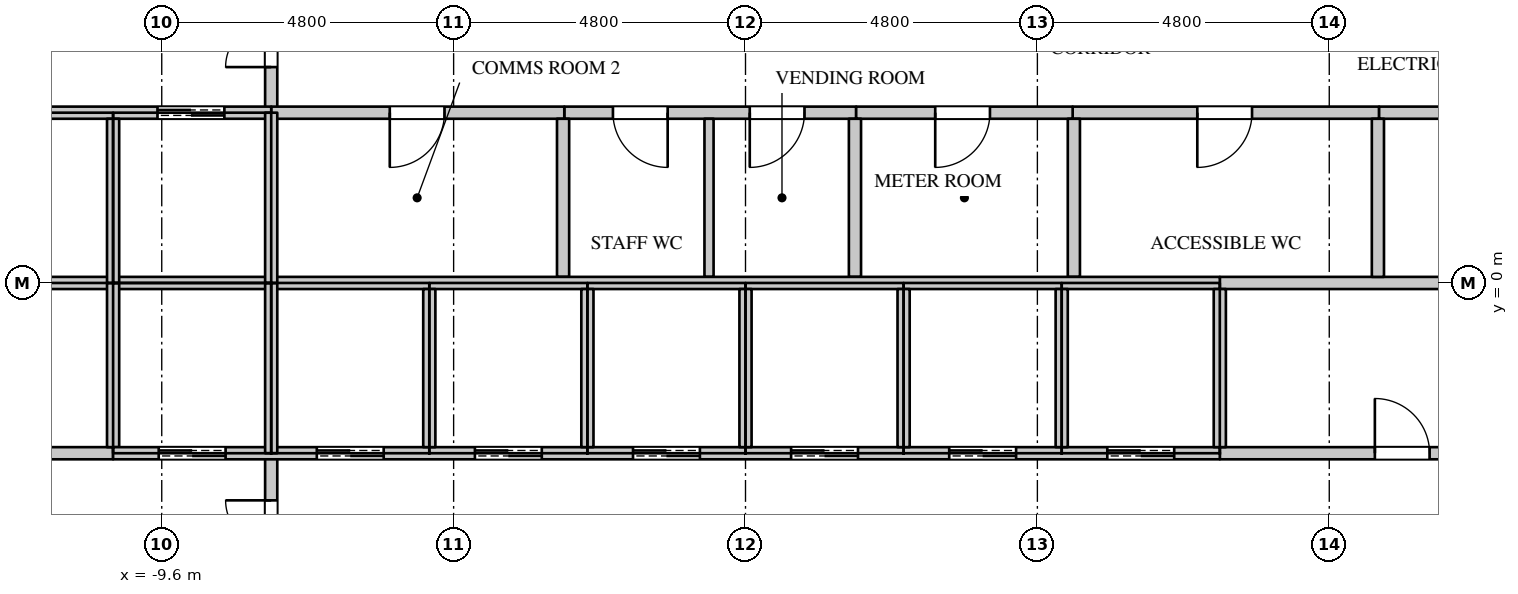
"""IFC4 building model, lengths in metres.
Left out: names, types, materials, properties, quantities, classifications, styles, units other than length and angle.
Written with IfcOpenShell. Run it as: python <this file> out.ifc"""

import sys

from ifc_helpers import new_model, si_unit, direction, frame, frame_2d, origin, place, context, subcontext, project, spatial, rectangle, extrude, element, fill, save


model = new_model("IFC4")
c1 = context("Model", 3, precision=1e-05, world=origin(), true_north=direction((0.0, 1.0)))
c2 = subcontext(c1, "Body", "Model", "MODEL_VIEW")
j1 = project(units=[si_unit("LENGTHUNIT", "METRE"), si_unit("PLANEANGLEUNIT", "RADIAN")], contexts=[c1])
p1 = place(None, origin())
s1 = spatial("IfcSite", under=j1, at=p1, CompositionType="ELEMENT")
p2 = place(p1, origin())
s2 = spatial("IfcBuilding", under=s1, at=p2, CompositionType="ELEMENT")
p3 = place(p2, frame((0.0, 0.0, 314.7)))
s3 = spatial("IfcBuildingStorey", under=s2, at=p3, CompositionType="ELEMENT", Elevation=314.7)
p4 = place(p3, frame((-7.8, -8.075, 0.0), z_axis=(0.0, 0.0, 1.0), x_axis=(0.0, 1.0, 0.0)))
e1 = element("IfcWall", 1, at=p4, inside=s3, PredefinedType="PARTITIONING", context=c2, shape_type="SweptSolid", body=[
    extrude(rectangle(XDim=5.275, YDim=0.2, at=frame_2d((2.637, 0.0))), origin(), (0.0, 0.0, 1.0), 5.1),
])
p5 = place(p4, frame((3.0, 0.0, 0.0)))
e2 = element("IfcOpeningElement", 2, at=p5, cuts=e1, PredefinedType="OPENING", context=c2, shape_type="SweptSolid", body=[
    extrude(rectangle(XDim=1.5, YDim=2.4, at=frame_2d((0.75, 1.2))), frame((0.0, 0.11, 0.0), z_axis=(0.0, -1.0, 0.0), x_axis=(1.0, 0.0, 0.0)), (0.0, 0.0, 1.0), 0.22),
])
p6 = place(p3, frame((-7.8, 2.8, 0.0), z_axis=(0.0, 0.0, 1.0), x_axis=(0.0, 1.0, 0.0)))
e3 = element("IfcWall", 3, at=p6, inside=s3, PredefinedType="PARTITIONING", context=c2, shape_type="SweptSolid", body=[
    extrude(rectangle(XDim=5.275, YDim=0.2, at=frame_2d((2.637, 0.0))), origin(), (0.0, 0.0, 1.0), 5.1),
])
p7 = place(p6, frame((0.75, 0.0, 0.0)))
e4 = element("IfcOpeningElement", 4, at=p7, cuts=e3, PredefinedType="OPENING", context=c2, shape_type="SweptSolid", body=[
    extrude(rectangle(XDim=1.5, YDim=2.4, at=frame_2d((0.75, 1.2))), frame((0.0, 0.11, 0.0), z_axis=(0.0, -1.0, 0.0), x_axis=(1.0, 0.0, 0.0)), (0.0, 0.0, 1.0), 0.22),
])
p8 = place(p3, frame((-2.98, 2.8, 0.0), z_axis=(0.0, 0.0, 1.0), x_axis=(1.0, 0.0, 0.0)))
e5 = element("IfcWall", 5, at=p8, inside=s3, PredefinedType="PARTITIONING", context=c2, shape_type="SweptSolid", body=[
    extrude(rectangle(XDim=4.8, YDim=0.2, at=frame_2d((2.4, 0.0))), origin(), (0.0, 0.0, 1.0), 5.1),
])
p9 = place(p8, frame((0.8, 0.0, 0.0)))
e6 = element("IfcOpeningElement", 6, at=p9, cuts=e5, PredefinedType="OPENING", context=c2, shape_type="SweptSolid", body=[
    extrude(rectangle(XDim=0.9, YDim=2.2, at=frame_2d((0.45, 1.1))), frame((0.0, 0.11, 0.0), z_axis=(0.0, -1.0, 0.0), x_axis=(1.0, 0.0, 0.0)), (0.0, 0.0, 1.0), 0.22),
])
p10 = place(p8, frame((3.05, 0.0, 0.0)))
e7 = element("IfcOpeningElement", 7, at=p10, cuts=e5, PredefinedType="OPENING", context=c2, shape_type="SweptSolid", body=[
    extrude(rectangle(XDim=0.9, YDim=2.2, at=frame_2d((0.45, 1.1))), frame((0.0, 0.11, 0.0), z_axis=(0.0, -1.0, 0.0), x_axis=(1.0, 0.0, 0.0)), (0.0, 0.0, 1.0), 0.22),
])
p11 = place(p3, frame((5.38, 2.8, 0.0), z_axis=(0.0, 0.0, 1.0), x_axis=(1.0, 0.0, 0.0)))
e8 = element("IfcWall", 8, at=p11, inside=s3, PredefinedType="PARTITIONING", context=c2, shape_type="SweptSolid", body=[
    extrude(rectangle(XDim=5.04, YDim=0.2, at=frame_2d((2.52, 0.0))), origin(), (0.0, 0.0, 1.0), 5.1),
])
p12 = place(p11, frame((2.05, 0.0, 0.0)))
e9 = element("IfcOpeningElement", 9, at=p12, cuts=e8, PredefinedType="OPENING", context=c2, shape_type="SweptSolid", body=[
    extrude(rectangle(XDim=0.9, YDim=2.2, at=frame_2d((0.45, 1.1))), frame((0.0, 0.11, 0.0), z_axis=(0.0, -1.0, 0.0), x_axis=(1.0, 0.0, 0.0)), (0.0, 0.0, 1.0), 0.22),
])
p13 = place(p3, frame((-0.6, 0.1, 0.0), z_axis=(0.0, 0.0, 1.0), x_axis=(0.0, 1.0, 0.0)))
e10 = element("IfcWall", 10, at=p13, inside=s3, PredefinedType="PARTITIONING", context=c2, shape_type="SweptSolid", body=[
    extrude(rectangle(XDim=2.6, YDim=0.15, at=frame_2d((1.3, 0.0))), origin(), (0.0, 0.0, 1.0), 5.1),
])
p14 = place(p3, frame((-13.77, -2.8, 0.0), z_axis=(0.0, 0.0, 1.0), x_axis=(1.0, 0.0, 0.0)))
e11 = element("IfcWall", 11, at=p14, inside=s3, PredefinedType="PARTITIONING", context=c2, shape_type="SweptSolid", body=[
    extrude(rectangle(XDim=3.37, YDim=0.2, at=frame_2d((1.685, 0.0))), origin(), (0.0, 0.0, 1.0), 5.1),
])
p15 = place(p14, frame((1.35, 0.0, 0.0)))
e12 = element("IfcOpeningElement", 12, at=p15, cuts=e11, PredefinedType="OPENING", context=c2, shape_type="SweptSolid", body=[
    extrude(rectangle(XDim=0.6, YDim=2.0, at=frame_2d((0.3, 1.0))), frame((0.0, 0.11, 0.0), z_axis=(0.0, -1.0, 0.0), x_axis=(1.0, 0.0, 0.0)), (0.0, 0.0, 1.0), 0.22),
])
p16 = place(p3, frame((-7.8, 2.8, 0.0), z_axis=(0.0, 0.0, 1.0), x_axis=(1.0, 0.0, 0.0)))
e13 = element("IfcWall", 13, at=p16, inside=s3, PredefinedType="PARTITIONING", context=c2, shape_type="SweptSolid", body=[
    extrude(rectangle(XDim=4.82, YDim=0.2, at=frame_2d((2.41, 0.0))), origin(), (0.0, 0.0, 1.0), 5.1),
])
p17 = place(p16, frame((1.95, 0.0, 0.0)))
e14 = element("IfcOpeningElement", 14, at=p17, cuts=e13, PredefinedType="OPENING", context=c2, shape_type="SweptSolid", body=[
    extrude(rectangle(XDim=0.9, YDim=2.2, at=frame_2d((0.45, 1.1))), frame((0.0, 0.11, 0.0), z_axis=(0.0, -1.0, 0.0), x_axis=(1.0, 0.0, 0.0)), (0.0, 0.0, 1.0), 0.22),
])
p18 = place(p3, frame((-3.0, 0.1, 0.0), z_axis=(0.0, 0.0, 1.0), x_axis=(0.0, 1.0, 0.0)))
e15 = element("IfcWall", 15, at=p18, inside=s3, PredefinedType="PARTITIONING", context=c2, shape_type="SweptSolid", body=[
    extrude(rectangle(XDim=2.6, YDim=0.2, at=frame_2d((1.3, 0.0))), origin(), (0.0, 0.0, 1.0), 5.1),
])
p19 = place(p3, frame((1.82, 2.8, 0.0), z_axis=(0.0, 0.0, 1.0), x_axis=(1.0, 0.0, 0.0)))
e16 = element("IfcWall", 16, at=p19, inside=s3, PredefinedType="PARTITIONING", context=c2, shape_type="SweptSolid", body=[
    extrude(rectangle(XDim=3.56, YDim=0.2, at=frame_2d((1.78, 0.0))), origin(), (0.0, 0.0, 1.0), 5.1),
])
p20 = place(p19, frame((1.3, 0.0, 0.0)))
e17 = element("IfcOpeningElement", 17, at=p20, cuts=e16, PredefinedType="OPENING", context=c2, shape_type="SweptSolid", body=[
    extrude(rectangle(XDim=0.9, YDim=2.2, at=frame_2d((0.45, 1.1))), frame((0.0, 0.11, 0.0), z_axis=(0.0, -1.0, 0.0), x_axis=(1.0, 0.0, 0.0)), (0.0, 0.0, 1.0), 0.22),
])
for number, where, z_axis, x_axis in (
    (18, (1.8, 0.1, 0.0), (0.0, 0.0, 1.0), (0.0, 1.0, 0.0)),
    (19, (5.4, 0.1, 0.0), (0.0, 0.0, 1.0), (0.0, 1.0, 0.0)),
):
    element("IfcWall", number, at=place(p3, frame(where, z_axis=z_axis, x_axis=x_axis)), inside=s3, PredefinedType="PARTITIONING", context=c2, shape_type="SweptSolid", body=[
        extrude(rectangle(XDim=2.6, YDim=0.2, at=frame_2d((1.3, 0.0))), origin(), (0.0, 0.0, 1.0), 5.1),
    ])
p21 = place(p3, frame((7.8, -2.8, 0.0), z_axis=(0.0, 0.0, 1.0), x_axis=(1.0, 0.0, 0.0)))
e20 = element("IfcWall", 20, at=p21, inside=s3, PredefinedType="PARTITIONING", context=c2, shape_type="SweptSolid", body=[
    extrude(rectangle(XDim=5.97, YDim=0.2, at=frame_2d((2.985, 0.0))), origin(), (0.0, 0.0, 1.0), 5.1),
])
p22 = place(p21, frame((2.55, 0.0, 0.0)))
e21 = element("IfcOpeningElement", 21, at=p22, cuts=e20, PredefinedType="OPENING", context=c2, shape_type="SweptSolid", body=[
    extrude(rectangle(XDim=0.9, YDim=2.2, at=frame_2d((0.45, 1.1))), frame((0.0, 0.11, 0.0), z_axis=(0.0, -1.0, 0.0), x_axis=(1.0, 0.0, 0.0)), (0.0, 0.0, 1.0), 0.22),
])
p23 = place(p3, frame((7.8, 0.0, 0.0), z_axis=(0.0, 0.0, 1.0), x_axis=(1.0, 0.0, 0.0)))
e22 = element("IfcWall", 22, at=p23, inside=s3, PredefinedType="PARTITIONING", context=c2, shape_type="SweptSolid", body=[
    extrude(rectangle(XDim=5.97, YDim=0.2, at=frame_2d((2.985, 0.0))), origin(), (0.0, 0.0, 1.0), 5.1),
])
p24 = place(p3, frame((10.42, 2.8, 0.0), z_axis=(0.0, 0.0, 1.0), x_axis=(1.0, 0.0, 0.0)))
e23 = element("IfcWall", 23, at=p24, inside=s3, PredefinedType="PARTITIONING", context=c2, shape_type="SweptSolid", body=[
    extrude(rectangle(XDim=3.35, YDim=0.2, at=frame_2d((1.675, 0.0))), origin(), (0.0, 0.0, 1.0), 5.1),
])
p25 = place(p24, frame((1.35, 0.0, 0.0)))
e24 = element("IfcOpeningElement", 24, at=p25, cuts=e23, PredefinedType="OPENING", context=c2, shape_type="SweptSolid", body=[
    extrude(rectangle(XDim=0.6, YDim=2.0, at=frame_2d((0.3, 1.0))), frame((0.0, 0.11, 0.0), z_axis=(0.0, -1.0, 0.0), x_axis=(1.0, 0.0, 0.0)), (0.0, 0.0, 1.0), 0.22),
])
p26 = place(p3, frame((10.4, 0.1, 0.0), z_axis=(0.0, 0.0, 1.0), x_axis=(0.0, 1.0, 0.0)))
e25 = element("IfcWall", 25, at=p26, inside=s3, PredefinedType="PARTITIONING", context=c2, shape_type="SweptSolid", body=[
    extrude(rectangle(XDim=2.6, YDim=0.2, at=frame_2d((1.3, 0.0))), origin(), (0.0, 0.0, 1.0), 5.1),
])
p27 = place(p3, frame((-13.77, 0.0, 0.0), z_axis=(0.0, 0.0, 1.0), x_axis=(1.0, 0.0, 0.0)))
e26 = element("IfcWall", 26, at=p27, inside=s3, PredefinedType="PARTITIONING", context=c2, shape_type="SweptSolid", body=[
    extrude(rectangle(XDim=21.57, YDim=0.2, at=frame_2d((10.785, 0.0))), origin(), (0.0, 0.0, 1.0), 5.1),
])
p28 = place(p3, frame((-13.77, 2.8, 0.0), z_axis=(0.0, 0.0, 1.0), x_axis=(1.0, 0.0, 0.0)))
e27 = element("IfcWall", 27, at=p28, inside=s3, PredefinedType="PARTITIONING", context=c2, shape_type="SweptSolid", body=[
    extrude(rectangle(XDim=5.97, YDim=0.2, at=frame_2d((2.985, 0.0))), origin(), (0.0, 0.0, 1.0), 5.1),
])
p29 = place(p28, frame((1.1, 0.0, 0.0)))
e28 = element("IfcOpeningElement", 28, at=p29, cuts=e27, PredefinedType="OPENING", context=c2, shape_type="SweptSolid", body=[
    extrude(rectangle(XDim=1.1, YDim=2.2, at=frame_2d((0.55, 1.1))), frame((0.0, 0.11, 0.0), z_axis=(0.0, -1.0, 0.0), x_axis=(1.0, 0.0, 0.0)), (0.0, 0.0, 1.0), 0.22),
])
p30 = place(p28, frame((4.1, 0.0, 0.0)))
e29 = element("IfcOpeningElement", 29, at=p30, cuts=e27, PredefinedType="OPENING", context=c2, shape_type="SweptSolid", body=[
    extrude(rectangle(XDim=1.1, YDim=2.2, at=frame_2d((0.55, 1.1))), frame((0.0, 0.11, 0.0), z_axis=(0.0, -1.0, 0.0), x_axis=(1.0, 0.0, 0.0)), (0.0, 0.0, 1.0), 0.22),
])
p31 = place(p3, frame((-10.4, -2.7, 0.0), z_axis=(0.0, 0.0, 1.0), x_axis=(0.0, 1.0, 0.0)))
e30 = element("IfcWall", 30, at=p31, inside=s3, PredefinedType="PARTITIONING", context=c2, shape_type="SweptSolid", body=[
    extrude(rectangle(XDim=2.7, YDim=0.2, at=frame_2d((1.35, 0.0))), origin(), (0.0, 0.0, 1.0), 5.1),
])
p32 = place(p3, frame((-10.4, -2.8, 0.0), z_axis=(0.0, 0.0, 1.0), x_axis=(1.0, 0.0, 0.0)))
e31 = element("IfcWall", 31, at=p32, inside=s3, PredefinedType="PARTITIONING", context=c2, shape_type="SweptSolid", body=[
    extrude(rectangle(XDim=18.2, YDim=0.2, at=frame_2d((9.1, 0.0))), origin(), (0.0, 0.0, 1.0), 5.1),
])
p33 = place(p32, frame((0.75, 0.0, 0.0)))
e32 = element("IfcOpeningElement", 32, at=p33, cuts=e31, PredefinedType="OPENING", context=c2, shape_type="SweptSolid", body=[
    extrude(rectangle(XDim=1.1, YDim=2.2, at=frame_2d((0.55, 1.1))), frame((0.0, 0.11, 0.0), z_axis=(0.0, -1.0, 0.0), x_axis=(1.0, 0.0, 0.0)), (0.0, 0.0, 1.0), 0.22),
])
p34 = place(p32, frame((3.35, 0.0, 0.0)))
e33 = element("IfcOpeningElement", 33, at=p34, cuts=e31, PredefinedType="OPENING", context=c2, shape_type="SweptSolid", body=[
    extrude(rectangle(XDim=1.1, YDim=2.2, at=frame_2d((0.55, 1.1))), frame((0.0, 0.11, 0.0), z_axis=(0.0, -1.0, 0.0), x_axis=(1.0, 0.0, 0.0)), (0.0, 0.0, 1.0), 0.22),
])
p35 = place(p32, frame((5.95, 0.0, 0.0)))
e34 = element("IfcOpeningElement", 34, at=p35, cuts=e31, PredefinedType="OPENING", context=c2, shape_type="SweptSolid", body=[
    extrude(rectangle(XDim=1.1, YDim=2.2, at=frame_2d((0.55, 1.1))), frame((0.0, 0.11, 0.0), z_axis=(0.0, -1.0, 0.0), x_axis=(1.0, 0.0, 0.0)), (0.0, 0.0, 1.0), 0.22),
])
p36 = place(p32, frame((8.55, 0.0, 0.0)))
e35 = element("IfcOpeningElement", 35, at=p36, cuts=e31, PredefinedType="OPENING", context=c2, shape_type="SweptSolid", body=[
    extrude(rectangle(XDim=1.1, YDim=2.2, at=frame_2d((0.55, 1.1))), frame((0.0, 0.11, 0.0), z_axis=(0.0, -1.0, 0.0), x_axis=(1.0, 0.0, 0.0)), (0.0, 0.0, 1.0), 0.22),
])
p37 = place(p32, frame((11.15, 0.0, 0.0)))
e36 = element("IfcOpeningElement", 36, at=p37, cuts=e31, PredefinedType="OPENING", context=c2, shape_type="SweptSolid", body=[
    extrude(rectangle(XDim=1.1, YDim=2.2, at=frame_2d((0.55, 1.1))), frame((0.0, 0.11, 0.0), z_axis=(0.0, -1.0, 0.0), x_axis=(1.0, 0.0, 0.0)), (0.0, 0.0, 1.0), 0.22),
])
p38 = place(p32, frame((13.75, 0.0, 0.0)))
e37 = element("IfcOpeningElement", 37, at=p38, cuts=e31, PredefinedType="OPENING", context=c2, shape_type="SweptSolid", body=[
    extrude(rectangle(XDim=1.1, YDim=2.2, at=frame_2d((0.55, 1.1))), frame((0.0, 0.11, 0.0), z_axis=(0.0, -1.0, 0.0), x_axis=(1.0, 0.0, 0.0)), (0.0, 0.0, 1.0), 0.22),
])
p39 = place(p32, frame((16.35, 0.0, 0.0)))
e38 = element("IfcOpeningElement", 38, at=p39, cuts=e31, PredefinedType="OPENING", context=c2, shape_type="SweptSolid", body=[
    extrude(rectangle(XDim=1.1, YDim=2.2, at=frame_2d((0.55, 1.1))), frame((0.0, 0.11, 0.0), z_axis=(0.0, -1.0, 0.0), x_axis=(1.0, 0.0, 0.0)), (0.0, 0.0, 1.0), 0.22),
])
p40 = place(p3, frame((-10.4, 0.0, 0.0), z_axis=(0.0, 0.0, 1.0), x_axis=(0.0, 1.0, 0.0)))
e39 = element("IfcWall", 39, at=p40, inside=s3, PredefinedType="PARTITIONING", context=c2, shape_type="SweptSolid", body=[
    extrude(rectangle(XDim=2.7, YDim=0.2, at=frame_2d((1.35, 0.0))), origin(), (0.0, 0.0, 1.0), 5.1),
])
for number, where, z_axis, x_axis in (
    (40, (-7.8, -2.8, 0.0), (0.0, 0.0, 1.0), (0.0, 1.0, 0.0)),
    (41, (-7.8, 0.0, 0.0), (0.0, 0.0, 1.0), (0.0, 1.0, 0.0)),
):
    element("IfcWall", number, at=place(p3, frame(where, z_axis=z_axis, x_axis=x_axis)), inside=s3, PredefinedType="PARTITIONING", context=c2, shape_type="SweptSolid", body=[
        extrude(rectangle(XDim=2.8, YDim=0.2, at=frame_2d((1.4, 0.0))), origin(), (0.0, 0.0, 1.0), 5.1),
    ])
for number, where, z_axis, x_axis in (
    (42, (-5.2, -2.7, 0.0), (0.0, 0.0, 1.0), (0.0, 1.0, 0.0)),
    (43, (-2.6, -2.7, 0.0), (0.0, 0.0, 1.0), (0.0, 1.0, 0.0)),
    (44, (0.0, -2.7, 0.0), (0.0, 0.0, 1.0), (0.0, 1.0, 0.0)),
    (45, (2.6, -2.7, 0.0), (0.0, 0.0, 1.0), (0.0, 1.0, 0.0)),
    (46, (5.2, -2.7, 0.0), (0.0, 0.0, 1.0), (0.0, 1.0, 0.0)),
    (47, (7.8, -2.7, 0.0), (0.0, 0.0, 1.0), (0.0, 1.0, 0.0)),
):
    element("IfcWall", number, at=place(p3, frame(where, z_axis=z_axis, x_axis=x_axis)), inside=s3, PredefinedType="PARTITIONING", context=c2, shape_type="SweptSolid", body=[
        extrude(rectangle(XDim=2.6, YDim=0.2, at=frame_2d((1.3, 0.0))), origin(), (0.0, 0.0, 1.0), 5.1),
    ])
p41 = place(p22, origin())
e48 = element("IfcDoor", 48, at=p41, inside=s3, OperationType="SINGLE_SWING_LEFT", PredefinedType="DOOR", context=c2, shape_type="SweptSolid", body=[
    extrude(rectangle(XDim=0.9, YDim=2.2, at=frame_2d((0.45, 1.1))), frame((0.0, 0.025, 0.0), z_axis=(0.0, -1.0, 0.0), x_axis=(1.0, 0.0, 0.0)), (0.0, 0.0, 1.0), 0.05),
])
fill(e21, e48)
p42 = place(p17, origin())
e49 = element("IfcDoor", 49, at=p42, inside=s3, OperationType="SINGLE_SWING_RIGHT", PredefinedType="DOOR", context=c2, shape_type="SweptSolid", body=[
    extrude(rectangle(XDim=0.9, YDim=2.2, at=frame_2d((0.45, 1.1))), frame((0.0, 0.025, 0.0), z_axis=(0.0, -1.0, 0.0), x_axis=(1.0, 0.0, 0.0)), (0.0, 0.0, 1.0), 0.05),
])
fill(e14, e49)
p43 = place(p9, origin())
e50 = element("IfcDoor", 50, at=p43, inside=s3, OperationType="SINGLE_SWING_LEFT", PredefinedType="DOOR", context=c2, shape_type="SweptSolid", body=[
    extrude(rectangle(XDim=0.9, YDim=2.2, at=frame_2d((0.45, 1.1))), frame((0.0, 0.025, 0.0), z_axis=(0.0, -1.0, 0.0), x_axis=(1.0, 0.0, 0.0)), (0.0, 0.0, 1.0), 0.05),
])
fill(e6, e50)
p44 = place(p10, origin())
e51 = element("IfcDoor", 51, at=p44, inside=s3, OperationType="SINGLE_SWING_RIGHT", PredefinedType="DOOR", context=c2, shape_type="SweptSolid", body=[
    extrude(rectangle(XDim=0.9, YDim=2.2, at=frame_2d((0.45, 1.1))), frame((0.0, 0.025, 0.0), z_axis=(0.0, -1.0, 0.0), x_axis=(1.0, 0.0, 0.0)), (0.0, 0.0, 1.0), 0.05),
])
fill(e7, e51)
p45 = place(p20, origin())
e52 = element("IfcDoor", 52, at=p45, inside=s3, OperationType="SINGLE_SWING_RIGHT", PredefinedType="DOOR", context=c2, shape_type="SweptSolid", body=[
    extrude(rectangle(XDim=0.9, YDim=2.2, at=frame_2d((0.45, 1.1))), frame((0.0, 0.025, 0.0), z_axis=(0.0, -1.0, 0.0), x_axis=(1.0, 0.0, 0.0)), (0.0, 0.0, 1.0), 0.05),
])
fill(e17, e52)
p46 = place(p12, origin())
e53 = element("IfcDoor", 53, at=p46, inside=s3, OperationType="SINGLE_SWING_RIGHT", PredefinedType="DOOR", context=c2, shape_type="SweptSolid", body=[
    extrude(rectangle(XDim=0.9, YDim=2.2, at=frame_2d((0.45, 1.1))), frame((0.0, 0.025, 0.0), z_axis=(0.0, -1.0, 0.0), x_axis=(1.0, 0.0, 0.0)), (0.0, 0.0, 1.0), 0.05),
])
fill(e9, e53)
p47 = place(p30, origin())
e54 = element("IfcDoor", 54, at=p47, inside=s3, OperationType="DOUBLE_DOOR_SLIDING", PredefinedType="DOOR", context=c2, shape_type="SweptSolid", body=[
    extrude(rectangle(XDim=1.1, YDim=2.2, at=frame_2d((0.55, 1.1))), frame((0.0, 0.025, 0.0), z_axis=(0.0, -1.0, 0.0), x_axis=(1.0, 0.0, 0.0)), (0.0, 0.0, 1.0), 0.05),
])
fill(e29, e54)
p48 = place(p33, origin())
e55 = element("IfcDoor", 55, at=p48, inside=s3, OperationType="DOUBLE_DOOR_SLIDING", PredefinedType="DOOR", context=c2, shape_type="SweptSolid", body=[
    extrude(rectangle(XDim=1.1, YDim=2.2, at=frame_2d((0.55, 1.1))), frame((0.0, 0.025, 0.0), z_axis=(0.0, -1.0, 0.0), x_axis=(1.0, 0.0, 0.0)), (0.0, 0.0, 1.0), 0.05),
])
fill(e32, e55)
p49 = place(p34, origin())
e56 = element("IfcDoor", 56, at=p49, inside=s3, OperationType="DOUBLE_DOOR_SLIDING", PredefinedType="DOOR", context=c2, shape_type="SweptSolid", body=[
    extrude(rectangle(XDim=1.1, YDim=2.2, at=frame_2d((0.55, 1.1))), frame((0.0, 0.025, 0.0), z_axis=(0.0, -1.0, 0.0), x_axis=(1.0, 0.0, 0.0)), (0.0, 0.0, 1.0), 0.05),
])
fill(e33, e56)
p50 = place(p35, origin())
e57 = element("IfcDoor", 57, at=p50, inside=s3, OperationType="DOUBLE_DOOR_SLIDING", PredefinedType="DOOR", context=c2, shape_type="SweptSolid", body=[
    extrude(rectangle(XDim=1.1, YDim=2.2, at=frame_2d((0.55, 1.1))), frame((0.0, 0.025, 0.0), z_axis=(0.0, -1.0, 0.0), x_axis=(1.0, 0.0, 0.0)), (0.0, 0.0, 1.0), 0.05),
])
fill(e34, e57)
p51 = place(p36, origin())
e58 = element("IfcDoor", 58, at=p51, inside=s3, OperationType="DOUBLE_DOOR_SLIDING", PredefinedType="DOOR", context=c2, shape_type="SweptSolid", body=[
    extrude(rectangle(XDim=1.1, YDim=2.2, at=frame_2d((0.55, 1.1))), frame((0.0, 0.025, 0.0), z_axis=(0.0, -1.0, 0.0), x_axis=(1.0, 0.0, 0.0)), (0.0, 0.0, 1.0), 0.05),
])
fill(e35, e58)
p52 = place(p37, origin())
e59 = element("IfcDoor", 59, at=p52, inside=s3, OperationType="DOUBLE_DOOR_SLIDING", PredefinedType="DOOR", context=c2, shape_type="SweptSolid", body=[
    extrude(rectangle(XDim=1.1, YDim=2.2, at=frame_2d((0.55, 1.1))), frame((0.0, 0.025, 0.0), z_axis=(0.0, -1.0, 0.0), x_axis=(1.0, 0.0, 0.0)), (0.0, 0.0, 1.0), 0.05),
])
fill(e36, e59)
p53 = place(p38, origin())
e60 = element("IfcDoor", 60, at=p53, inside=s3, OperationType="DOUBLE_DOOR_SLIDING", PredefinedType="DOOR", context=c2, shape_type="SweptSolid", body=[
    extrude(rectangle(XDim=1.1, YDim=2.2, at=frame_2d((0.55, 1.1))), frame((0.0, 0.025, 0.0), z_axis=(0.0, -1.0, 0.0), x_axis=(1.0, 0.0, 0.0)), (0.0, 0.0, 1.0), 0.05),
])
fill(e37, e60)
p54 = place(p39, origin())
e61 = element("IfcDoor", 61, at=p54, inside=s3, OperationType="DOUBLE_DOOR_SLIDING", PredefinedType="DOOR", context=c2, shape_type="SweptSolid", body=[
    extrude(rectangle(XDim=1.1, YDim=2.2, at=frame_2d((0.55, 1.1))), frame((0.0, 0.025, 0.0), z_axis=(0.0, -1.0, 0.0), x_axis=(1.0, 0.0, 0.0)), (0.0, 0.0, 1.0), 0.05),
])
fill(e38, e61)
p55 = place(p7, origin())
e62 = element("IfcDoor", 62, at=p55, inside=s3, OperationType="DOUBLE_DOOR_SINGLE_SWING", PredefinedType="DOOR", context=c2, shape_type="SweptSolid", body=[
    extrude(rectangle(XDim=1.5, YDim=2.4, at=frame_2d((0.75, 1.2))), frame((0.0, 0.025, 0.0), z_axis=(0.0, -1.0, 0.0), x_axis=(1.0, 0.0, 0.0)), (0.0, 0.0, 1.0), 0.05),
])
fill(e4, e62)
p56 = place(p5, origin())
e63 = element("IfcDoor", 63, at=p56, inside=s3, OperationType="DOUBLE_DOOR_SINGLE_SWING", PredefinedType="DOOR", context=c2, shape_type="SweptSolid", body=[
    extrude(rectangle(XDim=1.5, YDim=2.4, at=frame_2d((0.75, 1.2))), frame((0.0, 0.025, 0.0), z_axis=(0.0, -1.0, 0.0), x_axis=(1.0, 0.0, 0.0)), (0.0, 0.0, 1.0), 0.05),
])
fill(e2, e63)
save(model, sys.argv[1])
